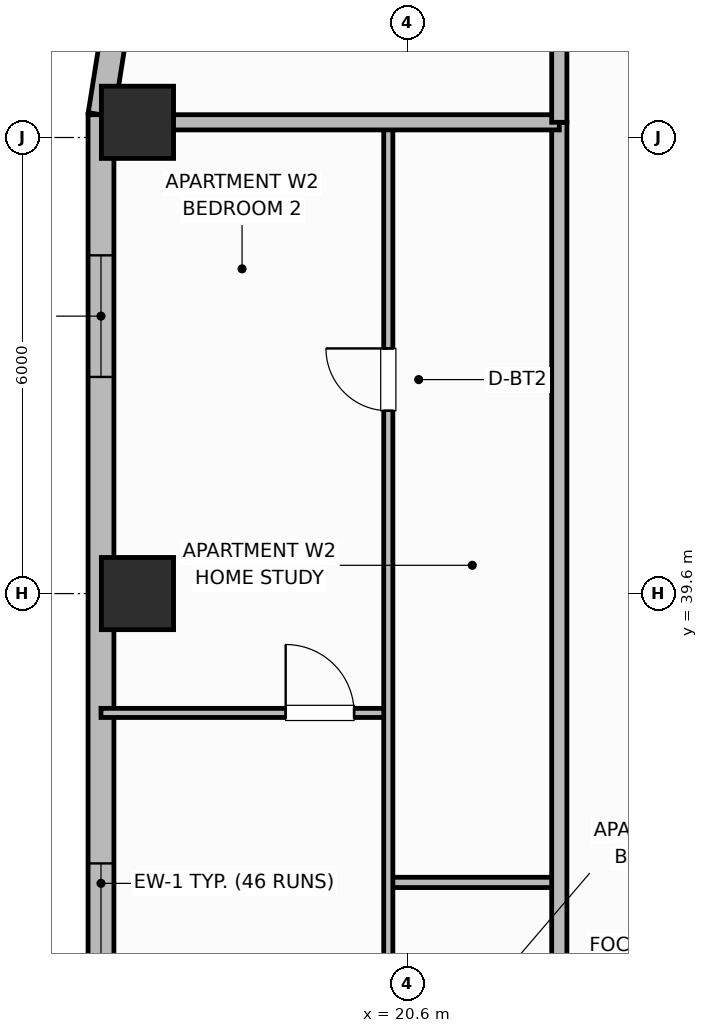
"""IFC4 building model, lengths in metres.
Left out: names, types, materials, properties, quantities, classifications, styles, units other than length and angle.
Written with IfcOpenShell. Run it as: python <this file> out.ifc"""

import sys

from ifc_helpers import new_model, si_unit, direction, frame, frame_2d, origin, origin_2d, place, context, subcontext, project, spatial, rectangle, extrude, element, fill, save


model = new_model("IFC4")
c1 = context("Model", 3, precision=1e-05, world=origin(), true_north=direction((0.0, 1.0)))
c2 = subcontext(c1, "Body", "Model", "MODEL_VIEW")
j1 = project(units=[si_unit("LENGTHUNIT", "METRE"), si_unit("PLANEANGLEUNIT", "RADIAN")], contexts=[c1])
p1 = place(None, origin())
s1 = spatial("IfcSite", under=j1, at=p1, CompositionType="ELEMENT")
p2 = place(p1, origin())
s2 = spatial("IfcBuilding", under=s1, at=p2, CompositionType="ELEMENT")
p3 = place(p2, frame((0.0, 0.0, 151.5)))
s3 = spatial("IfcBuildingStorey", under=s2, at=p3, CompositionType="ELEMENT", Elevation=151.5)
for number, where, z_axis, x_axis in (
    (1, (17.05, 39.6, 0.0), (0.0, 0.0, 1.0), (1.0, 0.0, 0.0)),
    (2, (17.05, 45.8, 0.0), (0.0, 0.0, 1.0), (1.0, 0.0, 0.0)),
):
    element("IfcColumn", number, at=place(p3, frame(where, z_axis=z_axis, x_axis=x_axis)), inside=s3, PredefinedType="COLUMN", context=c2, shape_type="SweptSolid", body=[
        extrude(rectangle(XDim=0.95, YDim=0.95, at=origin_2d()), origin(), (0.0, 0.0, 1.0), 3.7),
    ])
p4 = place(p3, frame((16.748, 47.022, 0.0), z_axis=(0.0, 0.0, 1.0), x_axis=(-0.156481329164, -0.987680916907, 0.0)))
e3 = element("IfcWall", 3, at=p4, inside=s3, PredefinedType="SOLIDWALL", context=c2, shape_type="SweptSolid", body=[
    extrude(rectangle(XDim=1.136, YDim=0.34, at=frame_2d((0.568, 0.0))), origin(), (0.0, 0.0, 1.0), 2.72),
])
p5 = place(p3, frame((16.57, 45.9, 0.0), z_axis=(0.0, 0.0, 1.0), x_axis=(0.0, -1.0, 0.0)))
e4 = element("IfcWall", 4, at=p5, inside=s3, PredefinedType="SOLIDWALL", context=c2, shape_type="SweptSolid", body=[
    extrude(rectangle(XDim=13.3, YDim=0.34, at=frame_2d((6.65, 0.0))), origin(), (0.0, 0.0, 1.0), 2.72),
])
p6 = place(p5, frame((1.85, 0.0, 0.7)))
e5 = element("IfcOpeningElement", 5, at=p6, cuts=e4, PredefinedType="OPENING", context=c2, shape_type="SweptSolid", body=[
    extrude(rectangle(XDim=1.6, YDim=1.9, at=frame_2d((0.8, 0.95))), frame((0.0, 0.18, 0.0), z_axis=(0.0, -1.0, 0.0), x_axis=(1.0, 0.0, 0.0)), (0.0, 0.0, 1.0), 0.36),
])
p7 = place(p5, frame((9.85, 0.0, 0.7)))
e6 = element("IfcOpeningElement", 6, at=p7, cuts=e4, PredefinedType="OPENING", context=c2, shape_type="SweptSolid", body=[
    extrude(rectangle(XDim=1.6, YDim=1.9, at=frame_2d((0.8, 0.95))), frame((0.0, 0.18, 0.0), z_axis=(0.0, -1.0, 0.0), x_axis=(1.0, 0.0, 0.0)), (0.0, 0.0, 1.0), 0.36),
])
p8 = place(p3, frame((20.35, 35.8, 0.0), z_axis=(0.0, 0.0, 1.0), x_axis=(1.0, 0.0, 0.0)))
e7 = element("IfcWall", 7, at=p8, inside=s3, PredefinedType="PARTITIONING", context=c2, shape_type="SweptSolid", body=[
    extrude(rectangle(XDim=2.25, YDim=0.135, at=frame_2d((1.125, 0.0))), origin(), (0.0, 0.0, 1.0), 2.55),
])
p9 = place(p3, frame((16.57, 38.03, 0.0), z_axis=(0.0, 0.0, 1.0), x_axis=(1.0, 0.0, 0.0)))
e8 = element("IfcWall", 8, at=p9, inside=s3, PredefinedType="PARTITIONING", context=c2, shape_type="SweptSolid", body=[
    extrude(rectangle(XDim=3.78, YDim=0.12, at=frame_2d((1.89, 0.0))), origin(), (0.0, 0.0, 1.0), 2.55),
])
p10 = place(p9, frame((2.43, 0.0, 0.0)))
e9 = element("IfcOpeningElement", 9, at=p10, cuts=e8, PredefinedType="OPENING", context=c2, shape_type="SweptSolid", body=[
    extrude(rectangle(XDim=0.9, YDim=2.1, at=frame_2d((0.45, 1.05))), frame((0.0, 0.07, 0.0), z_axis=(0.0, -1.0, 0.0), x_axis=(1.0, 0.0, 0.0)), (0.0, 0.0, 1.0), 0.14),
])
p11 = place(p3, frame((20.35, 26.64, 0.0), z_axis=(0.0, 0.0, 1.0), x_axis=(0.0, 1.0, 0.0)))
e10 = element("IfcWall", 10, at=p11, inside=s3, PredefinedType="PARTITIONING", context=c2, shape_type="SweptSolid", body=[
    extrude(rectangle(XDim=19.12, YDim=0.12, at=frame_2d((9.56, 0.0))), origin(), (0.0, 0.0, 1.0), 2.55),
])
p12 = place(p11, frame((2.81, 0.0, 0.0)))
e11 = element("IfcOpeningElement", 11, at=p12, cuts=e10, PredefinedType="OPENING", context=c2, shape_type="SweptSolid", body=[
    extrude(rectangle(XDim=0.9, YDim=2.1, at=frame_2d((0.45, 1.05))), frame((0.0, 0.07, 0.0), z_axis=(0.0, -1.0, 0.0), x_axis=(1.0, 0.0, 0.0)), (0.0, 0.0, 1.0), 0.14),
])
p13 = place(p11, frame((15.365, 0.0, 0.0)))
e12 = element("IfcOpeningElement", 12, at=p13, cuts=e10, PredefinedType="OPENING", context=c2, shape_type="SweptSolid", body=[
    extrude(rectangle(XDim=0.82, YDim=2.08, at=frame_2d((0.41, 1.04))), frame((0.0, 0.07, 0.0), z_axis=(0.0, -1.0, 0.0), x_axis=(1.0, 0.0, 0.0)), (0.0, 0.0, 1.0), 0.14),
])
p14 = place(p3, frame((22.6, 10.6, 0.0), z_axis=(0.0, 0.0, 1.0), x_axis=(0.0, 1.0, 0.0)))
e13 = element("IfcWall", 13, at=p14, inside=s3, PredefinedType="PARTITIONING", context=c2, shape_type="SweptSolid", body=[
    extrude(rectangle(XDim=35.2, YDim=0.2, at=frame_2d((17.6, 0.0))), origin(), (0.0, 0.0, 1.0), 2.55),
])
p15 = place(p14, frame((2.65, 0.0, 0.0)))
e14 = element("IfcOpeningElement", 14, at=p15, cuts=e13, PredefinedType="OPENING", context=c2, shape_type="SweptSolid", body=[
    extrude(rectangle(XDim=1.0, YDim=2.15, at=frame_2d((0.5, 1.075))), frame((0.0, 0.11, 0.0), z_axis=(0.0, -1.0, 0.0), x_axis=(1.0, 0.0, 0.0)), (0.0, 0.0, 1.0), 0.22),
])
p16 = place(p14, frame((19.95, 0.0, 0.0)))
e15 = element("IfcOpeningElement", 15, at=p16, cuts=e13, PredefinedType="OPENING", context=c2, shape_type="SweptSolid", body=[
    extrude(rectangle(XDim=1.0, YDim=2.15, at=frame_2d((0.5, 1.075))), frame((0.0, 0.11, 0.0), z_axis=(0.0, -1.0, 0.0), x_axis=(1.0, 0.0, 0.0)), (0.0, 0.0, 1.0), 0.22),
])
p17 = place(p3, frame((16.99, 45.8, 0.0), z_axis=(0.0, 0.0, 1.0), x_axis=(1.0, 0.0, 0.0)))
e16 = element("IfcWall", 16, at=p17, inside=s3, PredefinedType="PARTITIONING", context=c2, shape_type="SweptSolid", body=[
    extrude(rectangle(XDim=5.61, YDim=0.2, at=frame_2d((2.805, 0.0))), origin(), (0.0, 0.0, 1.0), 2.55),
])
p18 = place(p3, frame((22.6, 45.8, 0.0), z_axis=(0.0, 0.0, 1.0), x_axis=(0.0, 1.0, 0.0)))
e17 = element("IfcWall", 17, at=p18, inside=s3, PredefinedType="PARTITIONING", context=c2, shape_type="SweptSolid", body=[
    extrude(rectangle(XDim=3.73, YDim=0.2, at=frame_2d((1.865, 0.0))), origin(), (0.0, 0.0, 1.0), 2.55),
])
p19 = place(p6, origin())
e18 = element("IfcWindow", 18, at=p19, inside=s3, PartitioningType="SINGLE_PANEL", PredefinedType="WINDOW", context=c2, shape_type="SweptSolid", body=[
    extrude(rectangle(XDim=1.6, YDim=1.9, at=frame_2d((0.8, 0.95))), frame((0.0, 0.03, 0.0), z_axis=(0.0, -1.0, 0.0), x_axis=(1.0, 0.0, 0.0)), (0.0, 0.0, 1.0), 0.06),
])
fill(e5, e18)
p20 = place(p7, origin())
e19 = element("IfcWindow", 19, at=p20, inside=s3, PartitioningType="SINGLE_PANEL", PredefinedType="WINDOW", context=c2, shape_type="SweptSolid", body=[
    extrude(rectangle(XDim=1.6, YDim=1.9, at=frame_2d((0.8, 0.95))), frame((0.0, 0.03, 0.0), z_axis=(0.0, -1.0, 0.0), x_axis=(1.0, 0.0, 0.0)), (0.0, 0.0, 1.0), 0.06),
])
fill(e6, e19)
p21 = place(p10, origin())
e20 = element("IfcDoor", 20, at=p21, inside=s3, OperationType="SINGLE_SWING_LEFT", PredefinedType="DOOR", context=c2, shape_type="SweptSolid", body=[
    extrude(rectangle(XDim=0.9, YDim=2.1, at=frame_2d((0.45, 1.05))), frame((0.0, 0.025, 0.0), z_axis=(0.0, -1.0, 0.0), x_axis=(1.0, 0.0, 0.0)), (0.0, 0.0, 1.0), 0.05),
])
fill(e9, e20)
p22 = place(p13, origin())
e21 = element("IfcDoor", 21, at=p22, inside=s3, OperationType="SINGLE_SWING_RIGHT", PredefinedType="DOOR", context=c2, shape_type="SweptSolid", body=[
    extrude(rectangle(XDim=0.82, YDim=2.08, at=frame_2d((0.41, 1.04))), frame((0.0, 0.025, 0.0), z_axis=(0.0, -1.0, 0.0), x_axis=(1.0, 0.0, 0.0)), (0.0, 0.0, 1.0), 0.05),
])
fill(e12, e21)
save(model, sys.argv[1])
